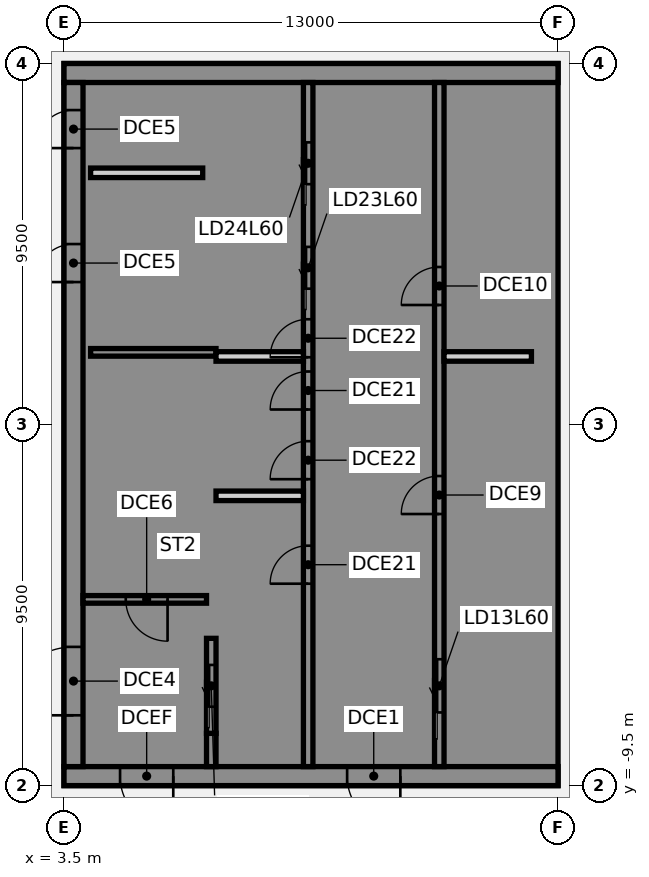
"""IFC4 building model, lengths in metres.
Left out: names, types, materials, properties, quantities, classifications, styles, units other than length and angle.
Written with IfcOpenShell. Run it as: python <this file> out.ifc"""

import sys

from ifc_helpers import new_model, si_unit, direction, frame, frame_2d, origin, place, context, subcontext, project, spatial, polyline, rectangle, outline, extrude, element, fill, save


model = new_model("IFC4")
c1 = context("Model", 3, precision=1e-05, world=origin(), true_north=direction((0.0, 1.0)))
c2 = subcontext(c1, "Body", "Model", "MODEL_VIEW")
j1 = project(units=[si_unit("LENGTHUNIT", "METRE"), si_unit("PLANEANGLEUNIT", "RADIAN")], contexts=[c1])
p1 = place(None, origin())
s1 = spatial("IfcSite", under=j1, at=p1, CompositionType="ELEMENT")
p2 = place(p1, origin())
s2 = spatial("IfcBuilding", under=s1, at=p2, CompositionType="ELEMENT")
p3 = place(p2, frame((0.0, 0.0, 237.9)))
s3 = spatial("IfcBuildingStorey", under=s2, at=p3, CompositionType="ELEMENT", Elevation=237.9)
p4 = place(p3, frame((16.5, -9.25, 0.0), z_axis=(0.0, 0.0, 1.0), x_axis=(-1.0, 0.0, 0.0)))
e1 = element("IfcWall", 1, at=p4, inside=s3, PredefinedType="SHEAR", context=c2, shape_type="SweptSolid", body=[
    extrude(rectangle(XDim=13.0, YDim=0.5, at=frame_2d((6.5, 0.0))), origin(), (0.0, 0.0, 1.0), 3.46),
])
p5 = place(p4, frame((4.15, 0.0, 0.0)))
e2 = element("IfcOpeningElement", 2, at=p5, cuts=e1, PredefinedType="OPENING", context=c2, shape_type="SweptSolid", body=[
    extrude(rectangle(XDim=1.4, YDim=2.1, at=frame_2d((0.7, 1.05))), frame((0.0, 0.26, 0.0), z_axis=(0.0, -1.0, 0.0), x_axis=(1.0, 0.0, 0.0)), (0.0, 0.0, 1.0), 0.52),
])
p6 = place(p4, frame((10.125, 0.0, 0.0)))
e3 = element("IfcOpeningElement", 3, at=p6, cuts=e1, PredefinedType="OPENING", context=c2, shape_type="SweptSolid", body=[
    extrude(rectangle(XDim=1.4, YDim=2.1, at=frame_2d((0.7, 1.05))), frame((0.0, 0.26, 0.0), z_axis=(0.0, -1.0, 0.0), x_axis=(1.0, 0.0, 0.0)), (0.0, 0.0, 1.0), 0.52),
])
p7 = place(p3, origin())
e4 = element("IfcWall", 4, at=p7, inside=s3, PredefinedType="SHEAR", context=c2, shape_type="SweptSolid", body=[
    extrude(outline(polyline([(13.5, -8.125), (13.5, -9.0), (16.0, -9.0), (16.5, -9.0), (16.5, 9.0), (16.0, 9.0), (13.5, 9.0), (13.5, 8.125), (16.0, 8.125), (16.0, 5.625), (13.5, 5.625), (13.5, 5.375), (16.0, 5.375), (16.0, -5.375), (13.5, -5.375), (13.5, -5.625), (16.0, -5.625), (16.0, -8.125), (13.5, -8.125)])), origin(), (0.0, 0.0, 1.0), 3.46),
])
p8 = place(p3, frame((16.5, 9.25, 0.0), z_axis=(0.0, 0.0, 1.0), x_axis=(-1.0, 0.0, 0.0)))
e5 = element("IfcWall", 5, at=p8, inside=s3, PredefinedType="SHEAR", context=c2, shape_type="SweptSolid", body=[
    extrude(rectangle(XDim=13.0, YDim=0.5, at=frame_2d((6.5, 0.0))), origin(), (0.0, 0.0, 1.0), 3.46),
])
p9 = place(p3, origin())
e6 = element("IfcWall", 6, at=p9, inside=s3, PredefinedType="SHEAR", context=c2, shape_type="SweptSolid", body=[
    extrude(outline(polyline([(9.8, -5.375), (7.5, -5.375), (7.5, 2.625), (9.8, 2.625), (9.8, 2.875), (7.5, 2.875), (7.5, 5.375), (9.8, 5.375), (9.8, 5.625), (7.5, 5.625), (7.5, 8.125), (9.8, 8.125), (9.8, 9.0), (7.5, 9.0), (7.25, 9.0), (7.25, -5.625), (7.5, -5.625), (9.8, -5.625), (9.8, -5.375)])), origin(), (0.0, 0.0, 1.0), 3.46),
])
p10 = place(p3, origin())
e7 = element("IfcWall", 7, at=p10, inside=s3, PredefinedType="SHEAR", context=c2, shape_type="SweptSolid", body=[
    extrude(outline(polyline([(7.5, -8.125), (7.5, -9.0), (9.8, -9.0), (9.8, -8.125), (9.8, -5.625), (9.55, -5.625), (9.55, -8.125), (7.5, -8.125)])), origin(), (0.0, 0.0, 1.0), 3.46),
])
p11 = place(p3, frame((7.375, -9.0, 0.0), z_axis=(0.0, 0.0, 1.0), x_axis=(0.0, 1.0, 0.0)))
e8 = element("IfcWall", 8, at=p11, inside=s3, PredefinedType="SHEAR", context=c2, shape_type="SweptSolid", body=[
    extrude(rectangle(XDim=0.875, YDim=0.25, at=frame_2d((0.438, 0.0))), origin(), (0.0, 0.0, 1.0), 3.46),
])
p12 = place(p3, frame((7.5, 1.9, 0.0), z_axis=(0.0, 0.0, 1.0), x_axis=(-1.0, 0.0, 0.0)))
e9 = element("IfcWall", 9, at=p12, inside=s3, PredefinedType="SHEAR", context=c2, shape_type="SweptSolid", body=[
    extrude(rectangle(XDim=3.3, YDim=0.2, at=frame_2d((1.65, 0.0))), origin(), (0.0, 0.0, 1.0), 3.46),
])
p13 = place(p3, frame((13.375, -9.0, 0.0), z_axis=(0.0, 0.0, 1.0), x_axis=(0.0, 1.0, 0.0)))
e10 = element("IfcWall", 10, at=p13, inside=s3, PredefinedType="SHEAR", context=c2, shape_type="SweptSolid", body=[
    extrude(rectangle(XDim=18.0, YDim=0.25, at=frame_2d((9.0, 0.0))), origin(), (0.0, 0.0, 1.0), 3.46),
])
p14 = place(p13, frame((1.425, 0.0, 0.0)))
e11 = element("IfcOpeningElement", 11, at=p14, cuts=e10, PredefinedType="OPENING", context=c2, shape_type="SweptSolid", body=[
    extrude(rectangle(XDim=1.4, YDim=2.1, at=frame_2d((0.7, 1.05))), frame((0.0, 0.135, 0.0), z_axis=(0.0, -1.0, 0.0), x_axis=(1.0, 0.0, 0.0)), (0.0, 0.0, 1.0), 0.27),
])
p15 = place(p13, frame((6.646, 0.0, 0.0)))
e12 = element("IfcOpeningElement", 12, at=p15, cuts=e10, PredefinedType="OPENING", context=c2, shape_type="SweptSolid", body=[
    extrude(rectangle(XDim=1.0, YDim=2.1, at=frame_2d((0.5, 1.05))), frame((0.0, 0.135, 0.0), z_axis=(0.0, -1.0, 0.0), x_axis=(1.0, 0.0, 0.0)), (0.0, 0.0, 1.0), 0.27),
])
p16 = place(p13, frame((12.146, 0.0, 0.0)))
e13 = element("IfcOpeningElement", 13, at=p16, cuts=e10, PredefinedType="OPENING", context=c2, shape_type="SweptSolid", body=[
    extrude(rectangle(XDim=1.0, YDim=2.1, at=frame_2d((0.5, 1.05))), frame((0.0, 0.135, 0.0), z_axis=(0.0, -1.0, 0.0), x_axis=(1.0, 0.0, 0.0)), (0.0, 0.0, 1.0), 0.27),
])
p17 = place(p3, frame((9.925, -9.0, 0.0), z_axis=(0.0, 0.0, 1.0), x_axis=(0.0, 1.0, 0.0)))
e14 = element("IfcWall", 14, at=p17, inside=s3, PredefinedType="SHEAR", context=c2, shape_type="SweptSolid", body=[
    extrude(rectangle(XDim=18.0, YDim=0.25, at=frame_2d((9.0, 0.0))), origin(), (0.0, 0.0, 1.0), 3.46),
])
p18 = place(p17, frame((12.575, 0.0, 0.0)))
e15 = element("IfcOpeningElement", 15, at=p18, cuts=e14, PredefinedType="OPENING", context=c2, shape_type="SweptSolid", body=[
    extrude(rectangle(XDim=1.1, YDim=2.1, at=frame_2d((0.55, 1.05))), frame((0.0, 0.135, 0.0), z_axis=(0.0, -1.0, 0.0), x_axis=(1.0, 0.0, 0.0)), (0.0, 0.0, 1.0), 0.27),
])
p19 = place(p17, frame((15.325, 0.0, 0.0)))
e16 = element("IfcOpeningElement", 16, at=p19, cuts=e14, PredefinedType="OPENING", context=c2, shape_type="SweptSolid", body=[
    extrude(rectangle(XDim=1.1, YDim=2.1, at=frame_2d((0.55, 1.05))), frame((0.0, 0.135, 0.0), z_axis=(0.0, -1.0, 0.0), x_axis=(1.0, 0.0, 0.0)), (0.0, 0.0, 1.0), 0.27),
])
p20 = place(p17, frame((4.812, 0.0, 0.0)))
e17 = element("IfcOpeningElement", 17, at=p20, cuts=e14, PredefinedType="OPENING", context=c2, shape_type="SweptSolid", body=[
    extrude(rectangle(XDim=1.0, YDim=2.1, at=frame_2d((0.5, 1.05))), frame((0.0, 0.135, 0.0), z_axis=(0.0, -1.0, 0.0), x_axis=(1.0, 0.0, 0.0)), (0.0, 0.0, 1.0), 0.27),
])
p21 = place(p17, frame((7.562, 0.0, 0.0)))
e18 = element("IfcOpeningElement", 18, at=p21, cuts=e14, PredefinedType="OPENING", context=c2, shape_type="SweptSolid", body=[
    extrude(rectangle(XDim=1.0, YDim=2.1, at=frame_2d((0.5, 1.05))), frame((0.0, 0.135, 0.0), z_axis=(0.0, -1.0, 0.0), x_axis=(1.0, 0.0, 0.0)), (0.0, 0.0, 1.0), 0.27),
])
p22 = place(p17, frame((9.396, 0.0, 0.0)))
e19 = element("IfcOpeningElement", 19, at=p22, cuts=e14, PredefinedType="OPENING", context=c2, shape_type="SweptSolid", body=[
    extrude(rectangle(XDim=1.0, YDim=2.1, at=frame_2d((0.5, 1.05))), frame((0.0, 0.135, 0.0), z_axis=(0.0, -1.0, 0.0), x_axis=(1.0, 0.0, 0.0)), (0.0, 0.0, 1.0), 0.27),
])
p23 = place(p17, frame((10.771, 0.0, 0.0)))
e20 = element("IfcOpeningElement", 20, at=p23, cuts=e14, PredefinedType="OPENING", context=c2, shape_type="SweptSolid", body=[
    extrude(rectangle(XDim=1.0, YDim=2.1, at=frame_2d((0.5, 1.05))), frame((0.0, 0.135, 0.0), z_axis=(0.0, -1.0, 0.0), x_axis=(1.0, 0.0, 0.0)), (0.0, 0.0, 1.0), 0.27),
])
p24 = place(p3, frame((7.375, -8.125, 0.0), z_axis=(0.0, 0.0, 1.0), x_axis=(0.0, 1.0, 0.0)))
e21 = element("IfcWall", 21, at=p24, inside=s3, PredefinedType="SHEAR", context=c2, shape_type="SweptSolid", body=[
    extrude(rectangle(XDim=2.5, YDim=0.25, at=frame_2d((1.25, 0.0))), origin(), (0.0, 0.0, 1.0), 3.46),
])
p25 = place(p24, frame((0.7, 0.0, 0.0)))
e22 = element("IfcOpeningElement", 22, at=p25, cuts=e21, PredefinedType="OPENING", context=c2, shape_type="SweptSolid", body=[
    extrude(rectangle(XDim=1.1, YDim=2.1, at=frame_2d((0.55, 1.05))), frame((0.0, 0.135, 0.0), z_axis=(0.0, -1.0, 0.0), x_axis=(1.0, 0.0, 0.0)), (0.0, 0.0, 1.0), 0.27),
])
p26 = place(p3, frame((3.75, -9.0, 0.0), z_axis=(0.0, 0.0, 1.0), x_axis=(0.0, 1.0, 0.0)))
e23 = element("IfcWall", 23, at=p26, inside=s3, PredefinedType="SHEAR", context=c2, shape_type="SweptSolid", body=[
    extrude(rectangle(XDim=18.0, YDim=0.5, at=frame_2d((9.0, 0.0))), origin(), (0.0, 0.0, 1.0), 3.46),
])
p27 = place(p26, frame((1.35, 0.0, 0.0)))
e24 = element("IfcOpeningElement", 24, at=p27, cuts=e23, PredefinedType="OPENING", context=c2, shape_type="SweptSolid", body=[
    extrude(rectangle(XDim=1.8, YDim=2.1, at=frame_2d((0.9, 1.05))), frame((0.0, 0.26, 0.0), z_axis=(0.0, -1.0, 0.0), x_axis=(1.0, 0.0, 0.0)), (0.0, 0.0, 1.0), 0.52),
])
p28 = place(p26, frame((12.75, 0.0, 0.0)))
e25 = element("IfcOpeningElement", 25, at=p28, cuts=e23, PredefinedType="OPENING", context=c2, shape_type="SweptSolid", body=[
    extrude(rectangle(XDim=1.0, YDim=2.1, at=frame_2d((0.5, 1.05))), frame((0.0, 0.26, 0.0), z_axis=(0.0, -1.0, 0.0), x_axis=(1.0, 0.0, 0.0)), (0.0, 0.0, 1.0), 0.52),
])
p29 = place(p26, frame((16.274, 0.0, 0.0)))
e26 = element("IfcOpeningElement", 26, at=p29, cuts=e23, PredefinedType="OPENING", context=c2, shape_type="SweptSolid", body=[
    extrude(rectangle(XDim=1.0, YDim=2.1, at=frame_2d((0.5, 1.05))), frame((0.0, 0.26, 0.0), z_axis=(0.0, -1.0, 0.0), x_axis=(1.0, 0.0, 0.0)), (0.0, 0.0, 1.0), 0.52),
])
p30 = place(p3, frame((7.15, 6.624, 0.0), z_axis=(0.0, 0.0, 1.0), x_axis=(-1.0, 0.0, 0.0)))
e27 = element("IfcWall", 27, at=p30, inside=s3, PredefinedType="PARTITIONING", context=c2, shape_type="SweptSolid", body=[
    extrude(rectangle(XDim=2.95, YDim=0.25, at=frame_2d((1.475, 0.0))), origin(), (0.0, 0.0, 1.0), 3.46),
])
p31 = place(p3, frame((7.25, -4.6, 0.0), z_axis=(0.0, 0.0, 1.0), x_axis=(-1.0, 0.0, 0.0)))
e28 = element("IfcWall", 28, at=p31, inside=s3, PredefinedType="SHEAR", context=c2, shape_type="SweptSolid", body=[
    extrude(rectangle(XDim=3.25, YDim=0.2, at=frame_2d((1.625, 0.0))), origin(), (0.0, 0.0, 1.0), 3.46),
])
p32 = place(p31, frame((1.025, 0.0, 0.0)))
e29 = element("IfcOpeningElement", 29, at=p32, cuts=e28, PredefinedType="OPENING", context=c2, shape_type="SweptSolid", body=[
    extrude(rectangle(XDim=1.1, YDim=2.1, at=frame_2d((0.55, 1.05))), frame((0.0, 0.11, 0.0), z_axis=(0.0, -1.0, 0.0), x_axis=(1.0, 0.0, 0.0)), (0.0, 0.0, 1.0), 0.22),
])
for number, where, z_axis, x_axis in (
    (30, (15.8, 1.792, 0.0), (0.0, 0.0, 1.0), (-1.0, 0.0, 0.0)),
    (31, (9.8, -1.875, 0.0), (0.0, 0.0, 1.0), (-1.0, 0.0, 0.0)),
    (32, (9.8, 1.792, 0.0), (0.0, 0.0, 1.0), (-1.0, 0.0, 0.0)),
):
    element("IfcWall", number, at=place(p3, frame(where, z_axis=z_axis, x_axis=x_axis)), inside=s3, PredefinedType="PARTITIONING", context=c2, shape_type="SweptSolid", body=[
        extrude(rectangle(XDim=2.3, YDim=0.25, at=frame_2d((1.15, 0.0))), origin(), (0.0, 0.0, 1.0), 3.46),
    ])
p33 = place(p5, origin())
e33 = element("IfcDoor", 33, at=p33, inside=s3, OperationType="SINGLE_SWING_LEFT", PredefinedType="DOOR", context=c2, shape_type="SweptSolid", body=[
    extrude(rectangle(XDim=1.4, YDim=2.1, at=frame_2d((0.7, 1.05))), frame((0.0, 0.025, 0.0), z_axis=(0.0, -1.0, 0.0), x_axis=(1.0, 0.0, 0.0)), (0.0, 0.0, 1.0), 0.05),
])
fill(e2, e33)
p34 = place(p6, origin())
e34 = element("IfcDoor", 34, at=p34, inside=s3, OperationType="SINGLE_SWING_LEFT", PredefinedType="DOOR", context=c2, shape_type="SweptSolid", body=[
    extrude(rectangle(XDim=1.4, YDim=2.1, at=frame_2d((0.7, 1.05))), frame((0.0, 0.025, 0.0), z_axis=(0.0, -1.0, 0.0), x_axis=(1.0, 0.0, 0.0)), (0.0, 0.0, 1.0), 0.05),
])
fill(e3, e34)
p35 = place(p27, origin())
e35 = element("IfcDoor", 35, at=p35, inside=s3, OperationType="SINGLE_SWING_LEFT", PredefinedType="DOOR", context=c2, shape_type="SweptSolid", body=[
    extrude(rectangle(XDim=1.8, YDim=2.1, at=frame_2d((0.9, 1.05))), frame((0.0, 0.025, 0.0), z_axis=(0.0, -1.0, 0.0), x_axis=(1.0, 0.0, 0.0)), (0.0, 0.0, 1.0), 0.05),
])
fill(e24, e35)
p36 = place(p28, origin())
e36 = element("IfcDoor", 36, at=p36, inside=s3, OperationType="SINGLE_SWING_LEFT", PredefinedType="DOOR", context=c2, shape_type="SweptSolid", body=[
    extrude(rectangle(XDim=1.0, YDim=2.1, at=frame_2d((0.5, 1.05))), frame((0.0, -0.175, 0.0), z_axis=(0.0, -1.0, 0.0), x_axis=(1.0, 0.0, 0.0)), (0.0, 0.0, 1.0), 0.05),
])
fill(e25, e36)
p37 = place(p29, origin())
e37 = element("IfcDoor", 37, at=p37, inside=s3, OperationType="SINGLE_SWING_LEFT", PredefinedType="DOOR", context=c2, shape_type="SweptSolid", body=[
    extrude(rectangle(XDim=1.0, YDim=2.1, at=frame_2d((0.5, 1.05))), frame((0.0, -0.175, 0.0), z_axis=(0.0, -1.0, 0.0), x_axis=(1.0, 0.0, 0.0)), (0.0, 0.0, 1.0), 0.05),
])
fill(e26, e37)
p38 = place(p32, origin())
e38 = element("IfcDoor", 38, at=p38, inside=s3, OperationType="SINGLE_SWING_LEFT", PredefinedType="DOOR", context=c2, shape_type="SweptSolid", body=[
    extrude(rectangle(XDim=1.1, YDim=2.1, at=frame_2d((0.55, 1.05))), frame((0.0, 0.025, 0.0), z_axis=(0.0, -1.0, 0.0), x_axis=(1.0, 0.0, 0.0)), (0.0, 0.0, 1.0), 0.05),
])
fill(e29, e38)
p39 = place(p14, origin())
e39 = element("IfcDoor", 39, at=p39, inside=s3, OperationType="SLIDING_TO_LEFT", PredefinedType="DOOR", context=c2, shape_type="SweptSolid", body=[
    extrude(rectangle(XDim=1.4, YDim=2.1, at=frame_2d((0.7, 1.05))), frame((0.0, 0.025, 0.0), z_axis=(0.0, -1.0, 0.0), x_axis=(1.0, 0.0, 0.0)), (0.0, 0.0, 1.0), 0.05),
])
fill(e11, e39)
p40 = place(p25, origin())
e40 = element("IfcDoor", 40, at=p40, inside=s3, OperationType="SLIDING_TO_LEFT", PredefinedType="DOOR", context=c2, shape_type="SweptSolid", body=[
    extrude(rectangle(XDim=1.1, YDim=2.1, at=frame_2d((0.55, 1.05))), frame((0.0, 0.025, 0.0), z_axis=(0.0, -1.0, 0.0), x_axis=(1.0, 0.0, 0.0)), (0.0, 0.0, 1.0), 0.05),
])
fill(e22, e40)
p41 = place(p18, origin())
e41 = element("IfcDoor", 41, at=p41, inside=s3, OperationType="SLIDING_TO_LEFT", PredefinedType="DOOR", context=c2, shape_type="SweptSolid", body=[
    extrude(rectangle(XDim=1.1, YDim=2.1, at=frame_2d((0.55, 1.05))), frame((0.0, 0.025, 0.0), z_axis=(0.0, -1.0, 0.0), x_axis=(1.0, 0.0, 0.0)), (0.0, 0.0, 1.0), 0.05),
])
fill(e15, e41)
p42 = place(p19, origin())
e42 = element("IfcDoor", 42, at=p42, inside=s3, OperationType="SLIDING_TO_LEFT", PredefinedType="DOOR", context=c2, shape_type="SweptSolid", body=[
    extrude(rectangle(XDim=1.1, YDim=2.1, at=frame_2d((0.55, 1.05))), frame((0.0, 0.025, 0.0), z_axis=(0.0, -1.0, 0.0), x_axis=(1.0, 0.0, 0.0)), (0.0, 0.0, 1.0), 0.05),
])
fill(e16, e42)
p43 = place(p15, origin())
e43 = element("IfcDoor", 43, at=p43, inside=s3, OperationType="SINGLE_SWING_LEFT", PredefinedType="DOOR", context=c2, shape_type="SweptSolid", body=[
    extrude(rectangle(XDim=1.0, YDim=2.1, at=frame_2d((0.5, 1.05))), frame((0.0, 0.025, 0.0), z_axis=(0.0, -1.0, 0.0), x_axis=(1.0, 0.0, 0.0)), (0.0, 0.0, 1.0), 0.05),
])
fill(e12, e43)
p44 = place(p16, origin())
e44 = element("IfcDoor", 44, at=p44, inside=s3, OperationType="SINGLE_SWING_LEFT", PredefinedType="DOOR", context=c2, shape_type="SweptSolid", body=[
    extrude(rectangle(XDim=1.0, YDim=2.1, at=frame_2d((0.5, 1.05))), frame((0.0, 0.025, 0.0), z_axis=(0.0, -1.0, 0.0), x_axis=(1.0, 0.0, 0.0)), (0.0, 0.0, 1.0), 0.05),
])
fill(e13, e44)
p45 = place(p20, origin())
e45 = element("IfcDoor", 45, at=p45, inside=s3, OperationType="SINGLE_SWING_LEFT", PredefinedType="DOOR", context=c2, shape_type="SweptSolid", body=[
    extrude(rectangle(XDim=1.0, YDim=2.1, at=frame_2d((0.5, 1.05))), frame((0.0, 0.025, 0.0), z_axis=(0.0, -1.0, 0.0), x_axis=(1.0, 0.0, 0.0)), (0.0, 0.0, 1.0), 0.05),
])
fill(e17, e45)
p46 = place(p21, origin())
e46 = element("IfcDoor", 46, at=p46, inside=s3, OperationType="SINGLE_SWING_LEFT", PredefinedType="DOOR", context=c2, shape_type="SweptSolid", body=[
    extrude(rectangle(XDim=1.0, YDim=2.1, at=frame_2d((0.5, 1.05))), frame((0.0, 0.025, 0.0), z_axis=(0.0, -1.0, 0.0), x_axis=(1.0, 0.0, 0.0)), (0.0, 0.0, 1.0), 0.05),
])
fill(e18, e46)
p47 = place(p22, origin())
e47 = element("IfcDoor", 47, at=p47, inside=s3, OperationType="SINGLE_SWING_LEFT", PredefinedType="DOOR", context=c2, shape_type="SweptSolid", body=[
    extrude(rectangle(XDim=1.0, YDim=2.1, at=frame_2d((0.5, 1.05))), frame((0.0, 0.025, 0.0), z_axis=(0.0, -1.0, 0.0), x_axis=(1.0, 0.0, 0.0)), (0.0, 0.0, 1.0), 0.05),
])
fill(e19, e47)
p48 = place(p23, origin())
e48 = element("IfcDoor", 48, at=p48, inside=s3, OperationType="SINGLE_SWING_LEFT", PredefinedType="DOOR", context=c2, shape_type="SweptSolid", body=[
    extrude(rectangle(XDim=1.0, YDim=2.1, at=frame_2d((0.5, 1.05))), frame((0.0, 0.025, 0.0), z_axis=(0.0, -1.0, 0.0), x_axis=(1.0, 0.0, 0.0)), (0.0, 0.0, 1.0), 0.05),
])
fill(e20, e48)
save(model, sys.argv[1])
